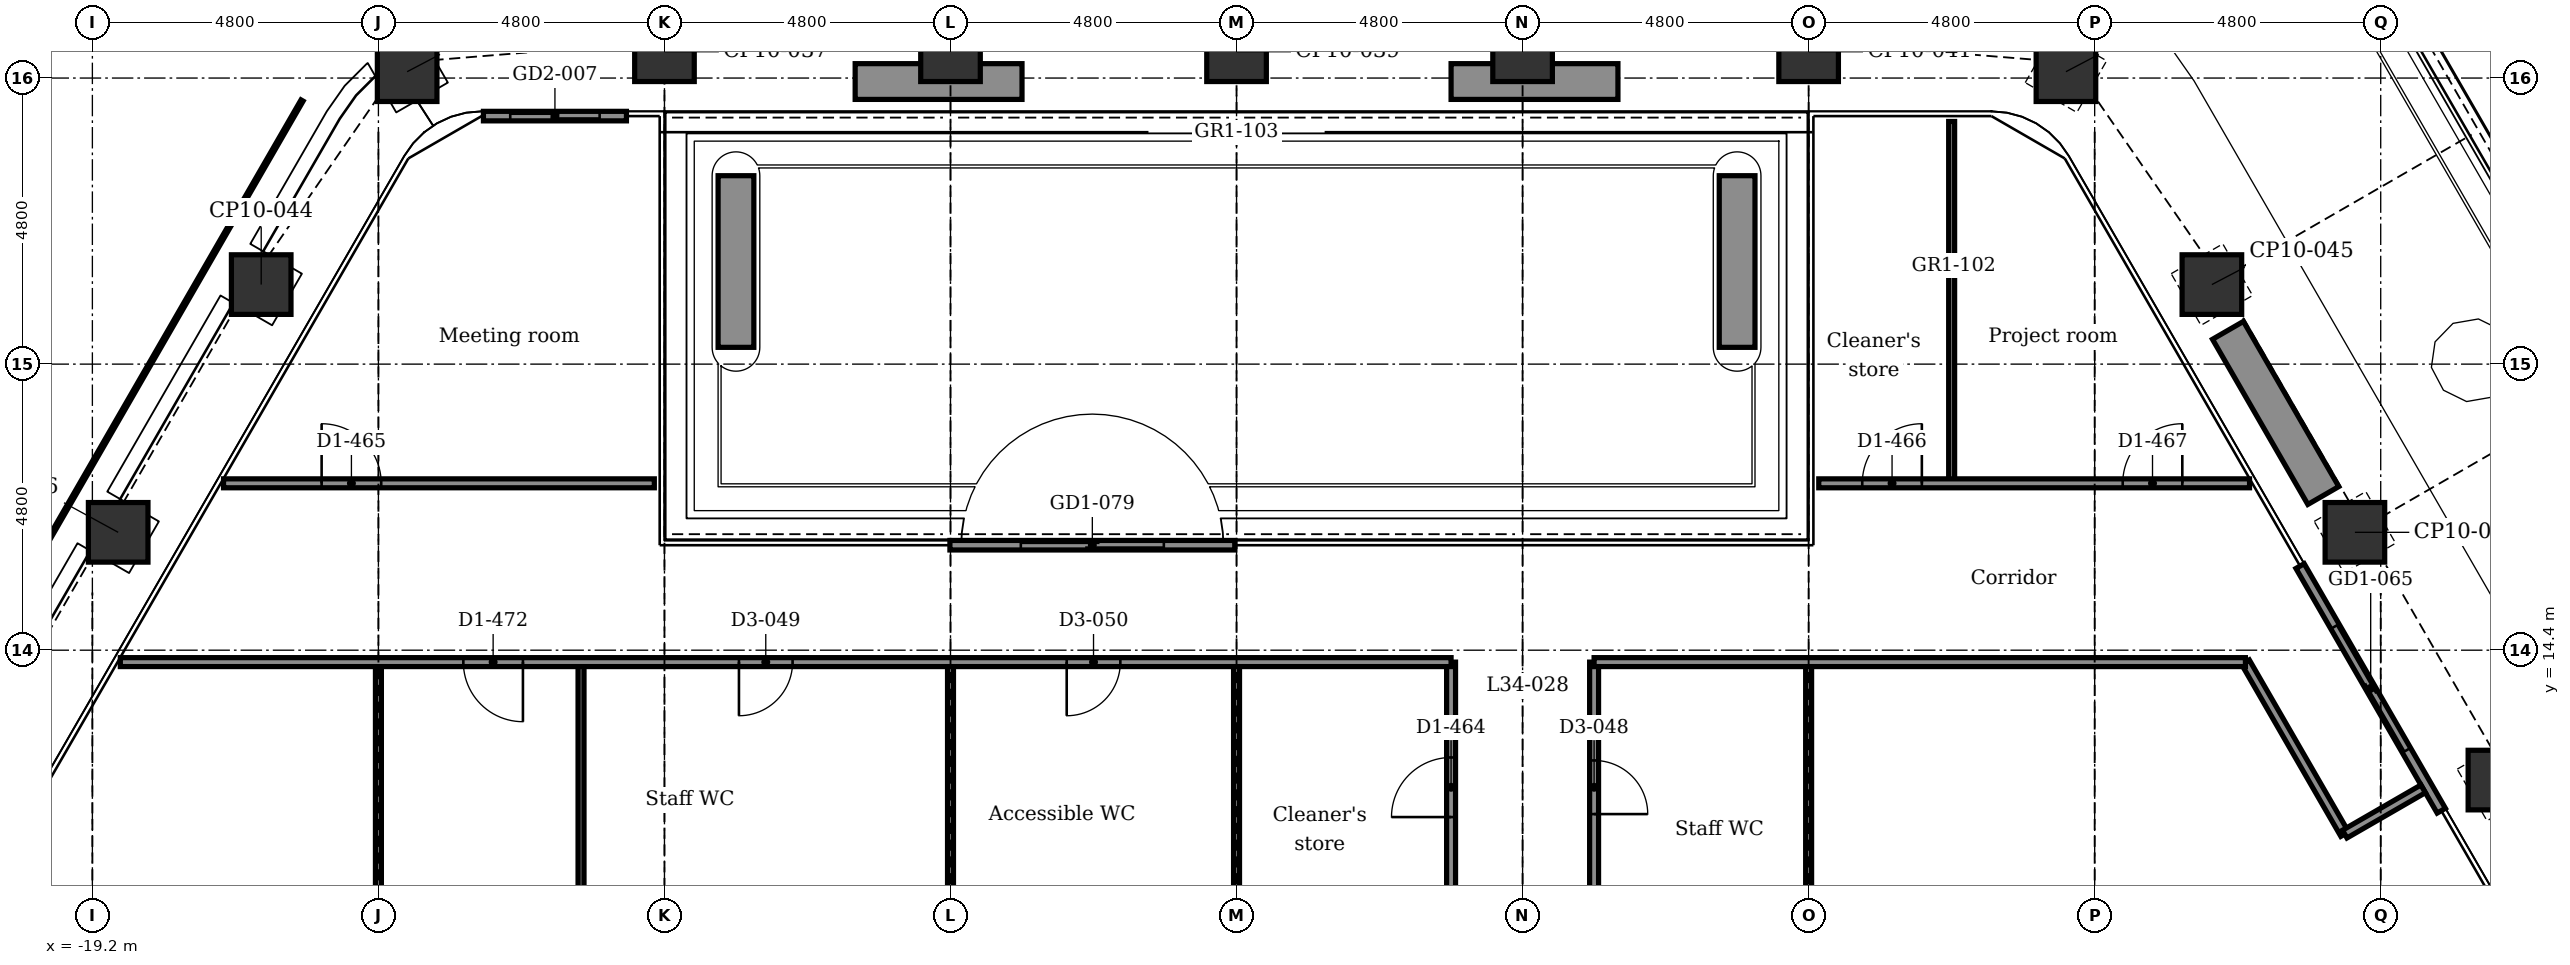
"""IFC4 building model, lengths in metres.
Left out: names, types, materials, properties, quantities, classifications, styles, units other than length and angle.
Written with IfcOpenShell. Run it as: python <this file> out.ifc"""

import sys

from ifc_helpers import new_model, si_unit, direction, frame, frame_2d, origin, origin_2d, place, context, subcontext, project, spatial, rectangle, extrude, element, fill, save


model = new_model("IFC4")
c1 = context("Model", 3, precision=1e-05, world=origin(), true_north=direction((0.0, 1.0)))
c2 = subcontext(c1, "Body", "Model", "MODEL_VIEW")
j1 = project(units=[si_unit("LENGTHUNIT", "METRE"), si_unit("PLANEANGLEUNIT", "RADIAN")], contexts=[c1])
p1 = place(None, origin())
s1 = spatial("IfcSite", under=j1, at=p1, CompositionType="ELEMENT")
p2 = place(p1, origin())
s2 = spatial("IfcBuilding", under=s1, at=p2, CompositionType="ELEMENT")
p3 = place(p2, frame((0.0, 0.0, 166.1)))
s3 = spatial("IfcBuildingStorey", under=s2, at=p3, CompositionType="ELEMENT", Elevation=166.1)
for number, where, z_axis, x_axis in (
    (1, (-13.918, 24.107, -0.15), (0.0, 0.0, 1.0), (0.866, 0.5, 0.0)),
    (2, (-9.6, 24.442, -0.15), (0.0, 0.0, 1.0), (1.0, 0.0, 0.0)),
    (3, (-4.8, 24.442, -0.15), (0.0, 0.0, 1.0), (1.0, 0.0, 0.0)),
    (4, (0.0, 24.442, -0.15), (0.0, 0.0, 1.0), (1.0, 0.0, 0.0)),
    (5, (4.8, 24.442, -0.15), (0.0, 0.0, 1.0), (1.0, 0.0, 0.0)),
    (6, (9.6, 24.442, -0.15), (0.0, 0.0, 1.0), (1.0, 0.0, 0.0)),
    (7, (13.918, 24.107, -0.15), (0.0, 0.0, 1.0), (0.5, 0.866, 0.0)),
    (8, (16.367, 20.535, -0.15), (0.0, 0.0, 1.0), (0.866, 0.5, 0.0)),
    (9, (18.767, 16.378, -0.15), (0.0, 0.0, 1.0), (0.866, 0.5, 0.0)),
    (10, (21.167, 12.221, -0.15), (0.0, 0.0, 1.0), (0.866, 0.5, 0.0)),
    (11, (-18.767, 16.378, -0.15), (0.0, 0.0, 1.0), (0.5, 0.866, 0.0)),
    (12, (-16.367, 20.535, -0.15), (0.0, 0.0, 1.0), (0.5, 0.866, 0.0)),
):
    element("IfcColumn", number, at=place(p3, frame(where, z_axis=z_axis, x_axis=x_axis)), inside=s3, PredefinedType="COLUMN", context=c2, shape_type="SweptSolid", body=[
        extrude(rectangle(XDim=1.0, YDim=1.0, at=origin_2d()), origin(), (0.0, 0.0, 1.0), 3.9),
    ])
p4 = place(p3, frame((-12.638, 23.362, 0.0), z_axis=(0.0, 0.0, 1.0), x_axis=(1.0, 0.0, 0.0)))
e13 = element("IfcWall", 13, at=p4, inside=s3, PredefinedType="PARTITIONING", context=c2, shape_type="SweptSolid", body=[
    extrude(rectangle(XDim=2.4, YDim=0.16, at=frame_2d((1.2, 0.0))), origin(), (0.0, 0.0, 1.0), 3.75),
])
p5 = place(p4, frame((0.45, 0.0, 0.0)))
e14 = element("IfcOpeningElement", 14, at=p5, cuts=e13, PredefinedType="OPENING", context=c2, shape_type="SweptSolid", body=[
    extrude(rectangle(XDim=1.5, YDim=2.4, at=frame_2d((0.75, 1.2))), frame((0.0, 0.09, 0.0), z_axis=(0.0, -1.0, 0.0), x_axis=(1.0, 0.0, 0.0)), (0.0, 0.0, 1.0), 0.18),
])
p6 = place(p3, frame((-4.81, 16.162, 0.0), z_axis=(0.0, 0.0, 1.0), x_axis=(1.0, 0.0, 0.0)))
e15 = element("IfcWall", 15, at=p6, inside=s3, PredefinedType="PARTITIONING", context=c2, shape_type="SweptSolid", body=[
    extrude(rectangle(XDim=4.78, YDim=0.16, at=frame_2d((2.39, 0.0))), origin(), (0.0, 0.0, 1.0), 3.75),
])
p7 = place(p6, frame((1.19, 0.0, 0.0)))
e16 = element("IfcOpeningElement", 16, at=p7, cuts=e15, PredefinedType="OPENING", context=c2, shape_type="SweptSolid", body=[
    extrude(rectangle(XDim=2.4, YDim=2.4, at=frame_2d((1.2, 1.2))), frame((0.0, 0.09, 0.0), z_axis=(0.0, -1.0, 0.0), x_axis=(1.0, 0.0, 0.0)), (0.0, 0.0, 1.0), 0.18),
])
p8 = place(p3, frame((17.847, 15.812, 0.0), z_axis=(0.0, 0.0, 1.0), x_axis=(0.5000167099, -0.866015756104, 0.0)))
e17 = element("IfcWall", 17, at=p8, inside=s3, PredefinedType="PARTITIONING", context=c2, shape_type="SweptSolid", body=[
    extrude(rectangle(XDim=4.74, YDim=0.16, at=frame_2d((2.37, 0.0))), origin(), (0.0, 0.0, 1.0), 3.75),
])
p9 = place(p8, frame((1.17, 0.0, 0.0)))
e18 = element("IfcOpeningElement", 18, at=p9, cuts=e17, PredefinedType="OPENING", context=c2, shape_type="SweptSolid", body=[
    extrude(rectangle(XDim=2.4, YDim=2.4, at=frame_2d((1.2, 1.2))), frame((0.0, 0.09, 0.0), z_axis=(0.0, -1.0, 0.0), x_axis=(1.0, 0.0, 0.0)), (0.0, 0.0, 1.0), 0.18),
])
p10 = place(p3, frame((16.637, 19.767, 0.0), z_axis=(0.0, 0.0, 1.0), x_axis=(0.500028443584, -0.866008981251, 0.0)))
e19 = element("IfcWall", 19, at=p10, inside=s3, PredefinedType="USERDEFINED", context=c2, shape_type="SweptSolid", body=[
    extrude(rectangle(XDim=3.2, YDim=0.6, at=frame_2d((1.6, 0.0))), origin(), (0.0, 0.0, 1.0), 0.7),
])
for number, where, z_axis, x_axis in (
    (20, (-8.4, 19.481, 0.0), (0.0, 0.0, 1.0), (0.0, 1.0, 0.0)),
    (21, (8.4, 19.481, 0.0), (0.0, 0.0, 1.0), (0.0, 1.0, 0.0)),
):
    element("IfcWall", number, at=place(p3, frame(where, z_axis=z_axis, x_axis=x_axis)), inside=s3, PredefinedType="USERDEFINED", context=c2, shape_type="SweptSolid", body=[
        extrude(rectangle(XDim=2.88, YDim=0.6, at=frame_2d((1.44, 0.0))), origin(), (0.0, 0.0, 1.0), 0.7),
    ])
for number, where, z_axis, x_axis in (
    (22, (-3.6, 23.942, 0.0), (0.0, 0.0, 1.0), (-1.0, 0.0, 0.0)),
    (23, (3.6, 23.942, 0.0), (0.0, 0.0, 1.0), (1.0, 0.0, 0.0)),
):
    element("IfcWall", number, at=place(p3, frame(where, z_axis=z_axis, x_axis=x_axis)), inside=s3, PredefinedType="USERDEFINED", context=c2, shape_type="SweptSolid", body=[
        extrude(rectangle(XDim=2.8, YDim=0.6, at=frame_2d((1.4, 0.0))), origin(), (0.0, 0.0, 1.0), 0.7),
    ])
p11 = place(p3, frame((12.0, 17.2, 0.0), z_axis=(0.0, 0.0, 1.0), x_axis=(0.0, 1.0, 0.0)))
e24 = element("IfcWall", 24, at=p11, inside=s3, PredefinedType="PARTITIONING", context=c2, shape_type="SweptSolid", body=[
    extrude(rectangle(XDim=6.072, YDim=0.1, at=frame_2d((3.036, 0.0))), origin(), (0.0, 0.0, 1.0), 3.75),
])
p12 = place(p3, frame((9.6, 9.95, 0.0), z_axis=(0.0, 0.0, 1.0), x_axis=(0.0, 1.0, 0.0)))
e25 = element("IfcWall", 25, at=p12, inside=s3, PredefinedType="PARTITIONING", context=c2, shape_type="SweptSolid", body=[
    extrude(rectangle(XDim=4.25, YDim=0.1, at=frame_2d((2.125, 0.0))), origin(), (0.0, 0.0, 1.0), 3.066),
])
p13 = place(p3, frame((6.0, 9.95, 0.0), z_axis=(0.0, 0.0, 1.0), x_axis=(0.0, 1.0, 0.0)))
e26 = element("IfcWall", 26, at=p13, inside=s3, PredefinedType="PARTITIONING", context=c2, shape_type="SweptSolid", body=[
    extrude(rectangle(XDim=4.25, YDim=0.15, at=frame_2d((2.125, 0.0))), origin(), (0.0, 0.0, 1.0), 3.75),
])
p14 = place(p13, frame((1.7, 0.0, 0.0)))
e27 = element("IfcOpeningElement", 27, at=p14, cuts=e26, PredefinedType="OPENING", context=c2, shape_type="SweptSolid", body=[
    extrude(rectangle(XDim=0.9, YDim=2.1, at=frame_2d((0.45, 1.05))), frame((0.0, 0.085, 0.0), z_axis=(0.0, -1.0, 0.0), x_axis=(1.0, 0.0, 0.0)), (0.0, 0.0, 1.0), 0.17),
])
p15 = place(p3, frame((3.6, 9.95, 0.0), z_axis=(0.0, 0.0, 1.0), x_axis=(0.0, 1.0, 0.0)))
e28 = element("IfcWall", 28, at=p15, inside=s3, PredefinedType="PARTITIONING", context=c2, shape_type="SweptSolid", body=[
    extrude(rectangle(XDim=4.25, YDim=0.15, at=frame_2d((2.125, 0.0))), origin(), (0.0, 0.0, 1.0), 3.75),
])
p16 = place(p15, frame((1.65, 0.0, 0.0)))
e29 = element("IfcOpeningElement", 29, at=p16, cuts=e28, PredefinedType="OPENING", context=c2, shape_type="SweptSolid", body=[
    extrude(rectangle(XDim=1.0, YDim=2.1, at=frame_2d((0.5, 1.05))), frame((0.0, 0.085, 0.0), z_axis=(0.0, -1.0, 0.0), x_axis=(1.0, 0.0, 0.0)), (0.0, 0.0, 1.0), 0.17),
])
for number, where, z_axis, x_axis in (
    (30, (0.0, 9.95, 0.0), (0.0, 0.0, 1.0), (0.0, 1.0, 0.0)),
    (31, (-4.8, 9.95, 0.0), (0.0, 0.0, 1.0), (0.0, 1.0, 0.0)),
):
    element("IfcWall", number, at=place(p3, frame(where, z_axis=z_axis, x_axis=x_axis)), inside=s3, PredefinedType="PARTITIONING", context=c2, shape_type="SweptSolid", body=[
        extrude(rectangle(XDim=4.25, YDim=0.1, at=frame_2d((2.125, 0.0))), origin(), (0.0, 0.0, 1.0), 3.066),
    ])
p17 = place(p3, frame((-11.0, 10.0, 0.0), z_axis=(0.0, 0.0, 1.0), x_axis=(0.0, 1.0, 0.0)))
e32 = element("IfcWall", 32, at=p17, inside=s3, PredefinedType="PARTITIONING", context=c2, shape_type="SweptSolid", body=[
    extrude(rectangle(XDim=4.2, YDim=0.1, at=frame_2d((2.1, 0.0))), origin(), (0.0, 0.0, 1.0), 3.75),
])
p18 = place(p3, frame((-14.4, 9.694, 0.0), z_axis=(0.0, 0.0, 1.0), x_axis=(0.0, 1.0, 0.0)))
e33 = element("IfcWall", 33, at=p18, inside=s3, PredefinedType="PARTITIONING", context=c2, shape_type="SweptSolid", body=[
    extrude(rectangle(XDim=4.506, YDim=0.1, at=frame_2d((2.253, 0.0))), origin(), (0.0, 0.0, 1.0), 3.066),
])
p19 = place(p3, frame((16.93, 14.2, 0.0), z_axis=(0.0, 0.0, 1.0), x_axis=(0.499976106316, -0.86603919837, 0.0)))
e34 = element("IfcWall", 34, at=p19, inside=s3, PredefinedType="PARTITIONING", context=c2, shape_type="SweptSolid", body=[
    extrude(rectangle(XDim=3.333, YDim=0.15, at=frame_2d((1.667, 0.0))), origin(), (0.0, 0.0, 1.0), 3.75),
])
p20 = place(p3, frame((18.596, 11.314, 0.0), z_axis=(0.0, 0.0, 1.0), x_axis=(0.866030456496, 0.499991248344, 0.0)))
e35 = element("IfcWall", 35, at=p20, inside=s3, PredefinedType="PARTITIONING", context=c2, shape_type="SweptSolid", body=[
    extrude(rectangle(XDim=1.52, YDim=0.15, at=frame_2d((0.76, 0.0))), origin(), (0.0, 0.0, 1.0), 3.75),
])
p21 = place(p3, frame((-18.731, 14.2, 0.0), z_axis=(0.0, 0.0, 1.0), x_axis=(1.0, 0.0, 0.0)))
e36 = element("IfcWall", 36, at=p21, inside=s3, PredefinedType="PARTITIONING", context=c2, shape_type="SweptSolid", body=[
    extrude(rectangle(XDim=22.331, YDim=0.15, at=frame_2d((11.166, 0.0))), origin(), (0.0, 0.0, 1.0), 3.75),
])
p22 = place(p21, frame((10.381, 0.0, 0.0)))
e37 = element("IfcOpeningElement", 37, at=p22, cuts=e36, PredefinedType="OPENING", context=c2, shape_type="SweptSolid", body=[
    extrude(rectangle(XDim=0.9, YDim=2.1, at=frame_2d((0.45, 1.05))), frame((0.0, 0.085, 0.0), z_axis=(0.0, -1.0, 0.0), x_axis=(1.0, 0.0, 0.0)), (0.0, 0.0, 1.0), 0.17),
])
p23 = place(p21, frame((15.881, 0.0, 0.0)))
e38 = element("IfcOpeningElement", 38, at=p23, cuts=e36, PredefinedType="OPENING", context=c2, shape_type="SweptSolid", body=[
    extrude(rectangle(XDim=0.9, YDim=2.1, at=frame_2d((0.45, 1.05))), frame((0.0, 0.085, 0.0), z_axis=(0.0, -1.0, 0.0), x_axis=(1.0, 0.0, 0.0)), (0.0, 0.0, 1.0), 0.17),
])
p24 = place(p21, frame((5.756, 0.0, 0.0)))
e39 = element("IfcOpeningElement", 39, at=p24, cuts=e36, PredefinedType="OPENING", context=c2, shape_type="SweptSolid", body=[
    extrude(rectangle(XDim=1.0, YDim=2.1, at=frame_2d((0.5, 1.05))), frame((0.0, 0.085, 0.0), z_axis=(0.0, -1.0, 0.0), x_axis=(1.0, 0.0, 0.0)), (0.0, 0.0, 1.0), 0.17),
])
p25 = place(p3, frame((6.0, 14.2, 0.0), z_axis=(0.0, 0.0, 1.0), x_axis=(1.0, 0.0, 0.0)))
e40 = element("IfcWall", 40, at=p25, inside=s3, PredefinedType="PARTITIONING", context=c2, shape_type="SweptSolid", body=[
    extrude(rectangle(XDim=10.93, YDim=0.15, at=frame_2d((5.465, 0.0))), origin(), (0.0, 0.0, 1.0), 3.75),
])
p26 = place(p3, frame((-16.999, 17.2, 0.0), z_axis=(0.0, 0.0, 1.0), x_axis=(1.0, 0.0, 0.0)))
e41 = element("IfcWall", 41, at=p26, inside=s3, PredefinedType="PARTITIONING", context=c2, shape_type="SweptSolid", body=[
    extrude(rectangle(XDim=7.229, YDim=0.15, at=frame_2d((3.615, 0.0))), origin(), (0.0, 0.0, 1.0), 3.75),
])
p27 = place(p26, frame((1.646, 0.0, 0.0)))
e42 = element("IfcOpeningElement", 42, at=p27, cuts=e41, PredefinedType="OPENING", context=c2, shape_type="SweptSolid", body=[
    extrude(rectangle(XDim=1.0, YDim=2.1, at=frame_2d((0.5, 1.05))), frame((0.0, 0.085, 0.0), z_axis=(0.0, -1.0, 0.0), x_axis=(1.0, 0.0, 0.0)), (0.0, 0.0, 1.0), 0.17),
])
p28 = place(p3, frame((9.77, 17.2, 0.0), z_axis=(0.0, 0.0, 1.0), x_axis=(1.0, 0.0, 0.0)))
e43 = element("IfcWall", 43, at=p28, inside=s3, PredefinedType="PARTITIONING", context=c2, shape_type="SweptSolid", body=[
    extrude(rectangle(XDim=7.229, YDim=0.15, at=frame_2d((3.615, 0.0))), origin(), (0.0, 0.0, 1.0), 3.75),
])
p29 = place(p28, frame((0.73, 0.0, 0.0)))
e44 = element("IfcOpeningElement", 44, at=p29, cuts=e43, PredefinedType="OPENING", context=c2, shape_type="SweptSolid", body=[
    extrude(rectangle(XDim=1.0, YDim=2.1, at=frame_2d((0.5, 1.05))), frame((0.0, 0.085, 0.0), z_axis=(0.0, -1.0, 0.0), x_axis=(1.0, 0.0, 0.0)), (0.0, 0.0, 1.0), 0.17),
])
p30 = place(p28, frame((5.101, 0.0, 0.0)))
e45 = element("IfcOpeningElement", 45, at=p30, cuts=e43, PredefinedType="OPENING", context=c2, shape_type="SweptSolid", body=[
    extrude(rectangle(XDim=1.0, YDim=2.1, at=frame_2d((0.5, 1.05))), frame((0.0, 0.085, 0.0), z_axis=(0.0, -1.0, 0.0), x_axis=(1.0, 0.0, 0.0)), (0.0, 0.0, 1.0), 0.17),
])
p31 = place(p5, origin())
e46 = element("IfcDoor", 46, at=p31, inside=s3, OperationType="DOUBLE_DOOR_SLIDING", PredefinedType="DOOR", context=c2, shape_type="SweptSolid", body=[
    extrude(rectangle(XDim=1.5, YDim=2.4, at=frame_2d((0.75, 1.2))), frame((0.0, 0.025, 0.0), z_axis=(0.0, -1.0, 0.0), x_axis=(1.0, 0.0, 0.0)), (0.0, 0.0, 1.0), 0.05),
])
fill(e14, e46)
p32 = place(p7, origin())
e47 = element("IfcDoor", 47, at=p32, inside=s3, OperationType="DOUBLE_DOOR_SLIDING", PredefinedType="DOOR", context=c2, shape_type="SweptSolid", body=[
    extrude(rectangle(XDim=2.4, YDim=2.4, at=frame_2d((1.2, 1.2))), frame((0.0, 0.025, 0.0), z_axis=(0.0, -1.0, 0.0), x_axis=(1.0, 0.0, 0.0)), (0.0, 0.0, 1.0), 0.05),
])
fill(e16, e47)
p33 = place(p9, origin())
e48 = element("IfcDoor", 48, at=p33, inside=s3, OperationType="DOUBLE_DOOR_SLIDING", PredefinedType="DOOR", context=c2, shape_type="SweptSolid", body=[
    extrude(rectangle(XDim=2.4, YDim=2.4, at=frame_2d((1.2, 1.2))), frame((0.0, 0.025, 0.0), z_axis=(0.0, -1.0, 0.0), x_axis=(1.0, 0.0, 0.0)), (0.0, 0.0, 1.0), 0.05),
])
fill(e18, e48)
p34 = place(p14, frame((0.9, 0.0, 0.0), z_axis=(0.0, 0.0, 1.0), x_axis=(-1.0, 0.0, 0.0)))
e49 = element("IfcDoor", 49, at=p34, inside=s3, OperationType="SINGLE_SWING_LEFT", PredefinedType="DOOR", context=c2, shape_type="SweptSolid", body=[
    extrude(rectangle(XDim=0.9, YDim=2.1, at=frame_2d((0.45, 1.05))), frame((0.0, 0.025, 0.0), z_axis=(0.0, -1.0, 0.0), x_axis=(1.0, 0.0, 0.0)), (0.0, 0.0, 1.0), 0.05),
])
fill(e27, e49)
p35 = place(p22, frame((0.9, 0.0, 0.0), z_axis=(0.0, 0.0, 1.0), x_axis=(-1.0, 0.0, 0.0)))
e50 = element("IfcDoor", 50, at=p35, inside=s3, OperationType="SINGLE_SWING_LEFT", PredefinedType="DOOR", context=c2, shape_type="SweptSolid", body=[
    extrude(rectangle(XDim=0.9, YDim=2.1, at=frame_2d((0.45, 1.05))), frame((0.0, 0.025, 0.0), z_axis=(0.0, -1.0, 0.0), x_axis=(1.0, 0.0, 0.0)), (0.0, 0.0, 1.0), 0.05),
])
fill(e37, e50)
p36 = place(p23, frame((0.9, 0.0, 0.0), z_axis=(0.0, 0.0, 1.0), x_axis=(-1.0, 0.0, 0.0)))
e51 = element("IfcDoor", 51, at=p36, inside=s3, OperationType="SINGLE_SWING_LEFT", PredefinedType="DOOR", context=c2, shape_type="SweptSolid", body=[
    extrude(rectangle(XDim=0.9, YDim=2.1, at=frame_2d((0.45, 1.05))), frame((0.0, 0.025, 0.0), z_axis=(0.0, -1.0, 0.0), x_axis=(1.0, 0.0, 0.0)), (0.0, 0.0, 1.0), 0.05),
])
fill(e38, e51)
p37 = place(p16, origin())
e52 = element("IfcDoor", 52, at=p37, inside=s3, OperationType="SINGLE_SWING_LEFT", PredefinedType="DOOR", context=c2, shape_type="SweptSolid", body=[
    extrude(rectangle(XDim=1.0, YDim=2.1, at=frame_2d((0.5, 1.05))), frame((0.0, 0.025, 0.0), z_axis=(0.0, -1.0, 0.0), x_axis=(1.0, 0.0, 0.0)), (0.0, 0.0, 1.0), 0.05),
])
fill(e29, e52)
p38 = place(p27, origin())
e53 = element("IfcDoor", 53, at=p38, inside=s3, OperationType="SINGLE_SWING_LEFT", PredefinedType="DOOR", context=c2, shape_type="SweptSolid", body=[
    extrude(rectangle(XDim=1.0, YDim=2.1, at=frame_2d((0.5, 1.05))), frame((0.0, 0.025, 0.0), z_axis=(0.0, -1.0, 0.0), x_axis=(1.0, 0.0, 0.0)), (0.0, 0.0, 1.0), 0.05),
])
fill(e42, e53)
p39 = place(p29, origin())
e54 = element("IfcDoor", 54, at=p39, inside=s3, OperationType="SINGLE_SWING_RIGHT", PredefinedType="DOOR", context=c2, shape_type="SweptSolid", body=[
    extrude(rectangle(XDim=1.0, YDim=2.1, at=frame_2d((0.5, 1.05))), frame((0.0, 0.025, 0.0), z_axis=(0.0, -1.0, 0.0), x_axis=(1.0, 0.0, 0.0)), (0.0, 0.0, 1.0), 0.05),
])
fill(e44, e54)
p40 = place(p30, origin())
e55 = element("IfcDoor", 55, at=p40, inside=s3, OperationType="SINGLE_SWING_RIGHT", PredefinedType="DOOR", context=c2, shape_type="SweptSolid", body=[
    extrude(rectangle(XDim=1.0, YDim=2.1, at=frame_2d((0.5, 1.05))), frame((0.0, 0.025, 0.0), z_axis=(0.0, -1.0, 0.0), x_axis=(1.0, 0.0, 0.0)), (0.0, 0.0, 1.0), 0.05),
])
fill(e45, e55)
p41 = place(p24, frame((1.0, 0.0, 0.0), z_axis=(0.0, 0.0, 1.0), x_axis=(-1.0, 0.0, 0.0)))
e56 = element("IfcDoor", 56, at=p41, inside=s3, OperationType="SINGLE_SWING_RIGHT", PredefinedType="DOOR", context=c2, shape_type="SweptSolid", body=[
    extrude(rectangle(XDim=1.0, YDim=2.1, at=frame_2d((0.5, 1.05))), frame((0.0, 0.025, 0.0), z_axis=(0.0, -1.0, 0.0), x_axis=(1.0, 0.0, 0.0)), (0.0, 0.0, 1.0), 0.05),
])
fill(e39, e56)
save(model, sys.argv[1])
